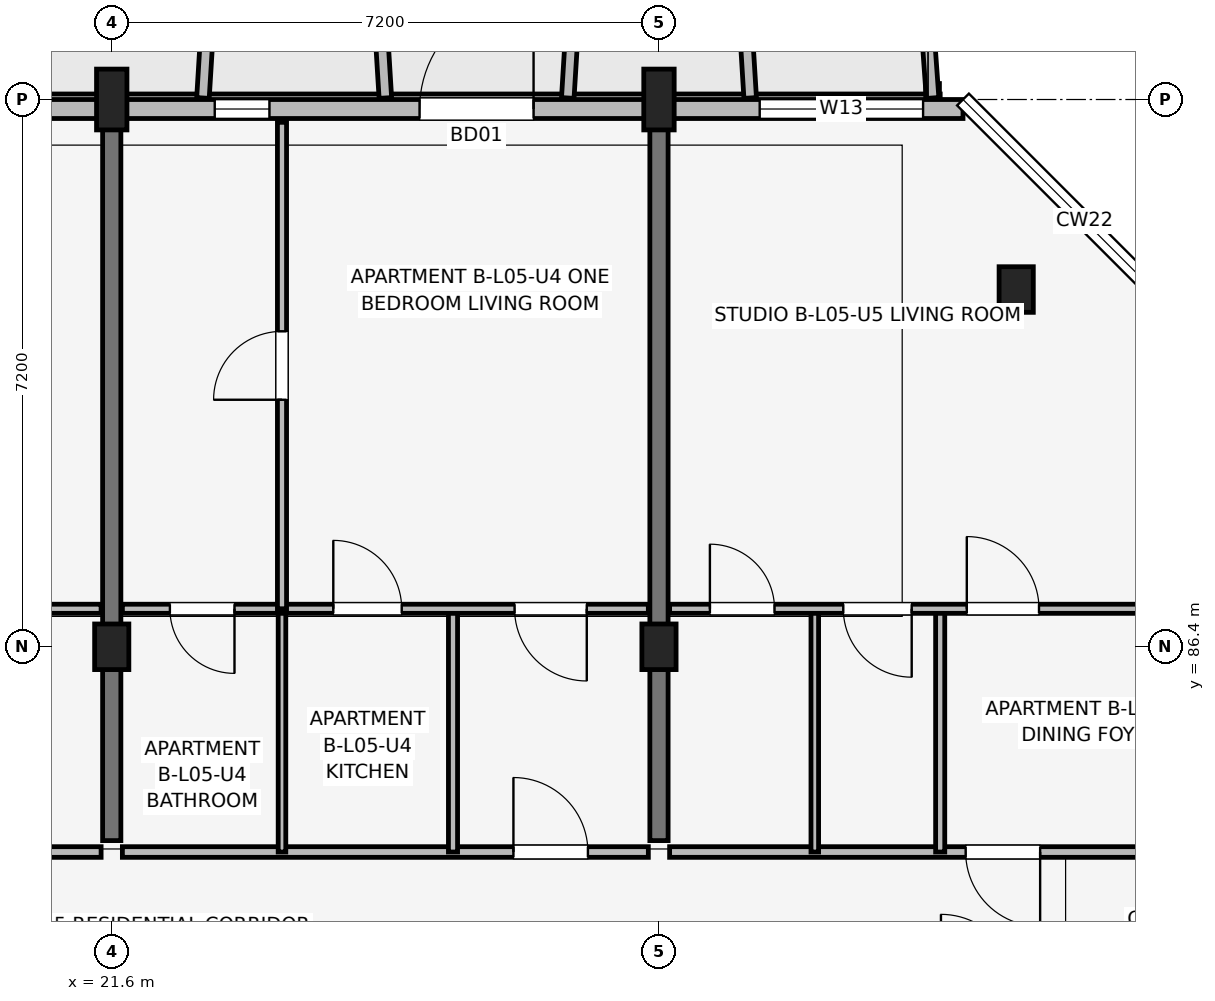
"""IFC4 building model, lengths in metres.
Left out: names, types, materials, properties, quantities, classifications, styles, units other than length and angle.
Written with IfcOpenShell. Run it as: python <this file> out.ifc"""

import sys

from ifc_helpers import new_model, si_unit, direction, frame, frame_2d, origin, origin_2d, place, context, subcontext, project, spatial, rectangle, extrude, element, fill, save


model = new_model("IFC4")
c1 = context("Model", 3, precision=1e-05, world=origin(), true_north=direction((0.0, 1.0)))
c2 = subcontext(c1, "Body", "Model", "MODEL_VIEW")
j1 = project(units=[si_unit("LENGTHUNIT", "METRE"), si_unit("PLANEANGLEUNIT", "RADIAN")], contexts=[c1])
p1 = place(None, origin())
s1 = spatial("IfcSite", under=j1, at=p1, CompositionType="ELEMENT")
p2 = place(p1, origin())
s2 = spatial("IfcBuilding", under=s1, at=p2, CompositionType="ELEMENT")
p3 = place(p2, frame((0.0, 0.0, 18.15)))
s3 = spatial("IfcBuildingStorey", under=s2, at=p3, CompositionType="ELEMENT", Elevation=18.15)
p4 = place(p3, frame((21.6, 86.4, 0.0), z_axis=(0.0, 0.0, 1.0), x_axis=(1.0, 0.0, 0.0)))
e1 = element("IfcColumn", 1, at=p4, inside=s3, PredefinedType="COLUMN", context=c2, shape_type="SweptSolid", body=[
    extrude(rectangle(XDim=0.45, YDim=0.6, at=origin_2d()), origin(), (0.0, 0.0, 1.0), 3.15),
])
p5 = place(p3, frame((21.6, 93.6, 0.0), z_axis=(0.0, 0.0, 1.0), x_axis=(1.0, 0.0, 0.0)))
e2 = element("IfcColumn", 2, at=p5, inside=s3, PredefinedType="COLUMN", context=c2, shape_type="SweptSolid", body=[
    extrude(rectangle(XDim=0.4, YDim=0.8, at=origin_2d()), origin(), (0.0, 0.0, 1.0), 3.15),
])
p6 = place(p3, frame((28.8, 86.4, 0.0), z_axis=(0.0, 0.0, 1.0), x_axis=(1.0, 0.0, 0.0)))
e3 = element("IfcColumn", 3, at=p6, inside=s3, PredefinedType="COLUMN", context=c2, shape_type="SweptSolid", body=[
    extrude(rectangle(XDim=0.45, YDim=0.6, at=origin_2d()), origin(), (0.0, 0.0, 1.0), 3.15),
])
p7 = place(p3, frame((28.8, 93.6, 0.0), z_axis=(0.0, 0.0, 1.0), x_axis=(1.0, 0.0, 0.0)))
e4 = element("IfcColumn", 4, at=p7, inside=s3, PredefinedType="COLUMN", context=c2, shape_type="SweptSolid", body=[
    extrude(rectangle(XDim=0.4, YDim=0.8, at=origin_2d()), origin(), (0.0, 0.0, 1.0), 3.15),
])
p8 = place(p3, frame((33.5, 91.1, 0.0), z_axis=(0.0, 0.0, 1.0), x_axis=(1.0, 0.0, 0.0)))
e5 = element("IfcColumn", 5, at=p8, inside=s3, PredefinedType="COLUMN", context=c2, shape_type="SweptSolid", body=[
    extrude(rectangle(XDim=0.45, YDim=0.6, at=origin_2d()), origin(), (0.0, 0.0, 1.0), 3.15),
])
for number, where, z_axis, x_axis in (
    (6, (21.6, 83.85, 0.0), (0.0, 0.0, 1.0), (0.0, 1.0, 0.0)),
    (7, (28.8, 83.85, 0.0), (0.0, 0.0, 1.0), (0.0, 1.0, 0.0)),
):
    element("IfcWall", number, at=place(p3, frame(where, z_axis=z_axis, x_axis=x_axis)), inside=s3, PredefinedType="SHEAR", context=c2, shape_type="SweptSolid", body=[
        extrude(rectangle(XDim=9.4, YDim=0.24, at=frame_2d((4.7, 0.0))), origin(), (0.0, 0.0, 1.0), 3.15),
    ])
p9 = place(p3, frame((32.8, 93.475, 0.0), z_axis=(0.0, 0.0, 1.0), x_axis=(-1.0, 0.0, 0.0)))
e8 = element("IfcWall", 8, at=p9, inside=s3, PredefinedType="SOLIDWALL", context=c2, shape_type="SweptSolid", body=[
    extrude(rectangle(XDim=29.6, YDim=0.25, at=frame_2d((14.8, 0.0))), origin(), (0.0, 0.0, 1.0), 2.43),
])
p10 = place(p9, frame((21.625, 0.0, 0.0), z_axis=(0.0, 0.0, 1.0), x_axis=(-1.0, 0.0, 0.0)))
e9 = element("IfcOpeningElement", 9, at=p10, cuts=e8, PredefinedType="OPENING", context=c2, shape_type="SweptSolid", body=[
    extrude(rectangle(XDim=1.65, YDim=2.15, at=frame_2d((0.825, 1.075))), frame((0.0, 0.135, 0.0), z_axis=(0.0, -1.0, 0.0), x_axis=(1.0, 0.0, 0.0)), (0.0, 0.0, 1.0), 0.27),
])
p11 = place(p9, frame((7.15, 0.0, 0.0), z_axis=(0.0, 0.0, 1.0), x_axis=(-1.0, 0.0, 0.0)))
e10 = element("IfcOpeningElement", 10, at=p11, cuts=e8, PredefinedType="OPENING", context=c2, shape_type="SweptSolid", body=[
    extrude(rectangle(XDim=1.5, YDim=2.15, at=frame_2d((0.75, 1.075))), frame((0.0, 0.135, 0.0), z_axis=(0.0, -1.0, 0.0), x_axis=(1.0, 0.0, 0.0)), (0.0, 0.0, 1.0), 0.27),
])
p12 = place(p9, frame((27.615, 0.0, 0.75)))
e11 = element("IfcOpeningElement", 11, at=p12, cuts=e8, PredefinedType="OPENING", context=c2, shape_type="SweptSolid", body=[
    extrude(rectangle(XDim=0.6, YDim=1.25, at=frame_2d((0.3, 0.625))), frame((0.0, 0.135, 0.0), z_axis=(0.0, -1.0, 0.0), x_axis=(1.0, 0.0, 0.0)), (0.0, 0.0, 1.0), 0.27),
])
p13 = place(p9, frame((23.525, 0.0, 0.75)))
e12 = element("IfcOpeningElement", 12, at=p13, cuts=e8, PredefinedType="OPENING", context=c2, shape_type="SweptSolid", body=[
    extrude(rectangle(XDim=0.72, YDim=1.35, at=frame_2d((0.36, 0.675))), frame((0.0, 0.135, 0.0), z_axis=(0.0, -1.0, 0.0), x_axis=(1.0, 0.0, 0.0)), (0.0, 0.0, 1.0), 0.27),
])
p14 = place(p9, frame((15.0, 0.0, 0.67)))
e13 = element("IfcOpeningElement", 13, at=p14, cuts=e8, PredefinedType="OPENING", context=c2, shape_type="SweptSolid", body=[
    extrude(rectangle(XDim=2.0, YDim=1.65, at=frame_2d((1.0, 0.825))), frame((0.0, 0.135, 0.0), z_axis=(0.0, -1.0, 0.0), x_axis=(1.0, 0.0, 0.0)), (0.0, 0.0, 1.0), 0.27),
])
p15 = place(p9, frame((9.125, 0.0, 0.75)))
e14 = element("IfcOpeningElement", 14, at=p15, cuts=e8, PredefinedType="OPENING", context=c2, shape_type="SweptSolid", body=[
    extrude(rectangle(XDim=0.72, YDim=1.35, at=frame_2d((0.36, 0.675))), frame((0.0, 0.135, 0.0), z_axis=(0.0, -1.0, 0.0), x_axis=(1.0, 0.0, 0.0)), (0.0, 0.0, 1.0), 0.27),
])
p16 = place(p9, frame((0.525, 0.0, 0.67)))
e15 = element("IfcOpeningElement", 15, at=p16, cuts=e8, PredefinedType="OPENING", context=c2, shape_type="SweptSolid", body=[
    extrude(rectangle(XDim=2.15, YDim=1.65, at=frame_2d((1.075, 0.825))), frame((0.0, 0.135, 0.0), z_axis=(0.0, -1.0, 0.0), x_axis=(1.0, 0.0, 0.0)), (0.0, 0.0, 1.0), 0.27),
])
for number, where, z_axis, x_axis in (
    (16, (22.8, 93.62, 0.0), (0.0, 0.0, 1.0), (0.061, 0.998, 0.0)),
    (17, (25.2, 93.62, 0.0), (0.0, 0.0, 1.0), (-0.061, 0.998, 0.0)),
    (18, (27.6, 93.62, 0.0), (0.0, 0.0, 1.0), (0.061, 0.998, 0.0)),
):
    element("IfcWall", number, at=place(p3, frame(where, z_axis=z_axis, x_axis=x_axis)), inside=s3, PredefinedType="ELEMENTEDWALL", context=c2, shape_type="SweptSolid", body=[
        extrude(rectangle(XDim=1.964, YDim=0.165, at=frame_2d((0.982, 0.0))), origin(), (0.0, 0.0, 1.0), 2.53),
    ])
p17 = place(p3, frame((30.0, 93.62, 0.0), z_axis=(0.0, 0.0, 1.0), x_axis=(-0.061170732449, 0.998127317276, 0.0)))
e19 = element("IfcWall", 19, at=p17, inside=s3, PredefinedType="ELEMENTEDWALL", context=c2, shape_type="SweptSolid", body=[
    extrude(rectangle(XDim=1.964, YDim=0.165, at=frame_2d((0.982, 0.0))), origin(), (0.0, 0.0, 1.0), 2.95),
])
p18 = place(p3, frame((32.4, 93.62, 0.0), z_axis=(0.0, 0.0, 1.0), x_axis=(-0.071194071069, 0.997462482625, 0.0)))
e20 = element("IfcWall", 20, at=p18, inside=s3, PredefinedType="ELEMENTEDWALL", context=c2, shape_type="SweptSolid", body=[
    extrude(rectangle(XDim=1.965, YDim=0.165, at=frame_2d((0.982, 0.0))), origin(), (0.0, 0.0, 1.0), 2.95),
])
p19 = place(p3, frame((14.54, 83.7, 0.0), z_axis=(0.0, 0.0, 1.0), x_axis=(1.0, 0.0, 0.0)))
e21 = element("IfcWall", 21, at=p19, inside=s3, PredefinedType="PARTITIONING", context=c2, shape_type="SweptSolid", body=[
    extrude(rectangle(XDim=6.92, YDim=0.14, at=frame_2d((3.46, 0.0))), origin(), (0.0, 0.0, 1.0), 2.38),
])
p20 = place(p19, frame((4.995, 0.0, 0.0)))
e22 = element("IfcOpeningElement", 22, at=p20, cuts=e21, PredefinedType="OPENING", context=c2, shape_type="SweptSolid", body=[
    extrude(rectangle(XDim=0.98, YDim=2.1, at=frame_2d((0.49, 1.05))), frame((0.0, 0.08, 0.0), z_axis=(0.0, -1.0, 0.0), x_axis=(1.0, 0.0, 0.0)), (0.0, 0.0, 1.0), 0.16),
])
p21 = place(p3, frame((14.54, 86.9, 0.0), z_axis=(0.0, 0.0, 1.0), x_axis=(1.0, 0.0, 0.0)))
e23 = element("IfcWall", 23, at=p21, inside=s3, PredefinedType="PARTITIONING", context=c2, shape_type="SweptSolid", body=[
    extrude(rectangle(XDim=6.92, YDim=0.12, at=frame_2d((3.46, 0.0))), origin(), (0.0, 0.0, 1.0), 2.38),
])
p22 = place(p21, frame((1.475, 0.0, 0.0), z_axis=(0.0, 0.0, 1.0), x_axis=(-1.0, 0.0, 0.0)))
e24 = element("IfcOpeningElement", 24, at=p22, cuts=e23, PredefinedType="OPENING", context=c2, shape_type="SweptSolid", body=[
    extrude(rectangle(XDim=0.85, YDim=2.08, at=frame_2d((0.425, 1.04))), frame((0.0, 0.07, 0.0), z_axis=(0.0, -1.0, 0.0), x_axis=(1.0, 0.0, 0.0)), (0.0, 0.0, 1.0), 0.14),
])
p23 = place(p21, frame((2.625, 0.0, 0.0)))
e25 = element("IfcOpeningElement", 25, at=p23, cuts=e23, PredefinedType="OPENING", context=c2, shape_type="SweptSolid", body=[
    extrude(rectangle(XDim=0.9, YDim=2.08, at=frame_2d((0.45, 1.04))), frame((0.0, 0.07, 0.0), z_axis=(0.0, -1.0, 0.0), x_axis=(1.0, 0.0, 0.0)), (0.0, 0.0, 1.0), 0.14),
])
p24 = place(p21, frame((5.96, 0.0, 0.0), z_axis=(0.0, 0.0, 1.0), x_axis=(-1.0, 0.0, 0.0)))
e26 = element("IfcOpeningElement", 26, at=p24, cuts=e23, PredefinedType="OPENING", context=c2, shape_type="SweptSolid", body=[
    extrude(rectangle(XDim=0.95, YDim=2.08, at=frame_2d((0.475, 1.04))), frame((0.0, 0.07, 0.0), z_axis=(0.0, -1.0, 0.0), x_axis=(1.0, 0.0, 0.0)), (0.0, 0.0, 1.0), 0.14),
])
p25 = place(p3, frame((21.74, 83.7, 0.0), z_axis=(0.0, 0.0, 1.0), x_axis=(1.0, 0.0, 0.0)))
e27 = element("IfcWall", 27, at=p25, inside=s3, PredefinedType="PARTITIONING", context=c2, shape_type="SweptSolid", body=[
    extrude(rectangle(XDim=6.92, YDim=0.14, at=frame_2d((3.46, 0.0))), origin(), (0.0, 0.0, 1.0), 2.38),
])
p26 = place(p25, frame((5.145, 0.0, 0.0)))
e28 = element("IfcOpeningElement", 28, at=p26, cuts=e27, PredefinedType="OPENING", context=c2, shape_type="SweptSolid", body=[
    extrude(rectangle(XDim=0.98, YDim=2.1, at=frame_2d((0.49, 1.05))), frame((0.0, 0.08, 0.0), z_axis=(0.0, -1.0, 0.0), x_axis=(1.0, 0.0, 0.0)), (0.0, 0.0, 1.0), 0.16),
])
p27 = place(p3, frame((23.84, 83.7, 0.0), z_axis=(0.0, 0.0, 1.0), x_axis=(0.0, 1.0, 0.0)))
e29 = element("IfcWall", 29, at=p27, inside=s3, PredefinedType="PARTITIONING", context=c2, shape_type="SweptSolid", body=[
    extrude(rectangle(XDim=3.2, YDim=0.1, at=frame_2d((1.6, 0.0))), origin(), (0.0, 0.0, 1.0), 2.375),
])
p28 = place(p3, frame((26.09, 83.7, 0.0), z_axis=(0.0, 0.0, 1.0), x_axis=(0.0, 1.0, 0.0)))
e30 = element("IfcWall", 30, at=p28, inside=s3, PredefinedType="PARTITIONING", context=c2, shape_type="SweptSolid", body=[
    extrude(rectangle(XDim=3.2, YDim=0.12, at=frame_2d((1.6, 0.0))), origin(), (0.0, 0.0, 1.0), 2.375),
])
p29 = place(p3, frame((21.74, 86.9, 0.0), z_axis=(0.0, 0.0, 1.0), x_axis=(1.0, 0.0, 0.0)))
e31 = element("IfcWall", 31, at=p29, inside=s3, PredefinedType="PARTITIONING", context=c2, shape_type="SweptSolid", body=[
    extrude(rectangle(XDim=6.92, YDim=0.12, at=frame_2d((3.46, 0.0))), origin(), (0.0, 0.0, 1.0), 2.38),
])
p30 = place(p29, frame((1.475, 0.0, 0.0), z_axis=(0.0, 0.0, 1.0), x_axis=(-1.0, 0.0, 0.0)))
e32 = element("IfcOpeningElement", 32, at=p30, cuts=e31, PredefinedType="OPENING", context=c2, shape_type="SweptSolid", body=[
    extrude(rectangle(XDim=0.85, YDim=2.08, at=frame_2d((0.425, 1.04))), frame((0.0, 0.07, 0.0), z_axis=(0.0, -1.0, 0.0), x_axis=(1.0, 0.0, 0.0)), (0.0, 0.0, 1.0), 0.14),
])
p31 = place(p29, frame((2.775, 0.0, 0.0)))
e33 = element("IfcOpeningElement", 33, at=p31, cuts=e31, PredefinedType="OPENING", context=c2, shape_type="SweptSolid", body=[
    extrude(rectangle(XDim=0.9, YDim=2.08, at=frame_2d((0.45, 1.04))), frame((0.0, 0.07, 0.0), z_axis=(0.0, -1.0, 0.0), x_axis=(1.0, 0.0, 0.0)), (0.0, 0.0, 1.0), 0.14),
])
p32 = place(p29, frame((6.11, 0.0, 0.0), z_axis=(0.0, 0.0, 1.0), x_axis=(-1.0, 0.0, 0.0)))
e34 = element("IfcOpeningElement", 34, at=p32, cuts=e31, PredefinedType="OPENING", context=c2, shape_type="SweptSolid", body=[
    extrude(rectangle(XDim=0.95, YDim=2.08, at=frame_2d((0.475, 1.04))), frame((0.0, 0.07, 0.0), z_axis=(0.0, -1.0, 0.0), x_axis=(1.0, 0.0, 0.0)), (0.0, 0.0, 1.0), 0.14),
])
p33 = place(p3, frame((23.84, 86.9, 0.0), z_axis=(0.0, 0.0, 1.0), x_axis=(0.0, 1.0, 0.0)))
e35 = element("IfcWall", 35, at=p33, inside=s3, PredefinedType="PARTITIONING", context=c2, shape_type="SweptSolid", body=[
    extrude(rectangle(XDim=6.4, YDim=0.12, at=frame_2d((3.2, 0.0))), origin(), (0.0, 0.0, 1.0), 2.38),
])
p34 = place(p33, frame((2.75, 0.0, 0.0)))
e36 = element("IfcOpeningElement", 36, at=p34, cuts=e35, PredefinedType="OPENING", context=c2, shape_type="SweptSolid", body=[
    extrude(rectangle(XDim=0.9, YDim=2.08, at=frame_2d((0.45, 1.04))), frame((0.0, 0.07, 0.0), z_axis=(0.0, -1.0, 0.0), x_axis=(1.0, 0.0, 0.0)), (0.0, 0.0, 1.0), 0.14),
])
p35 = place(p3, frame((28.94, 83.7, 0.0), z_axis=(0.0, 0.0, 1.0), x_axis=(1.0, 0.0, 0.0)))
e37 = element("IfcWall", 37, at=p35, inside=s3, PredefinedType="PARTITIONING", context=c2, shape_type="SweptSolid", body=[
    extrude(rectangle(XDim=6.92, YDim=0.14, at=frame_2d((3.46, 0.0))), origin(), (0.0, 0.0, 1.0), 2.38),
])
p36 = place(p35, frame((4.875, 0.0, 0.0), z_axis=(0.0, 0.0, 1.0), x_axis=(-1.0, 0.0, 0.0)))
e38 = element("IfcOpeningElement", 38, at=p36, cuts=e37, PredefinedType="OPENING", context=c2, shape_type="SweptSolid", body=[
    extrude(rectangle(XDim=0.98, YDim=2.1, at=frame_2d((0.49, 1.05))), frame((0.0, 0.08, 0.0), z_axis=(0.0, -1.0, 0.0), x_axis=(1.0, 0.0, 0.0)), (0.0, 0.0, 1.0), 0.16),
])
p37 = place(p3, frame((30.85, 83.7, 0.0), z_axis=(0.0, 0.0, 1.0), x_axis=(0.0, 1.0, 0.0)))
e39 = element("IfcWall", 39, at=p37, inside=s3, PredefinedType="PARTITIONING", context=c2, shape_type="SweptSolid", body=[
    extrude(rectangle(XDim=3.2, YDim=0.1, at=frame_2d((1.6, 0.0))), origin(), (0.0, 0.0, 1.0), 2.375),
])
p38 = place(p3, frame((32.5, 83.7, 0.0), z_axis=(0.0, 0.0, 1.0), x_axis=(0.0, 1.0, 0.0)))
e40 = element("IfcWall", 40, at=p38, inside=s3, PredefinedType="PARTITIONING", context=c2, shape_type="SweptSolid", body=[
    extrude(rectangle(XDim=3.2, YDim=0.12, at=frame_2d((1.6, 0.0))), origin(), (0.0, 0.0, 1.0), 2.375),
])
p39 = place(p3, frame((28.94, 86.9, 0.0), z_axis=(0.0, 0.0, 1.0), x_axis=(1.0, 0.0, 0.0)))
e41 = element("IfcWall", 41, at=p39, inside=s3, PredefinedType="PARTITIONING", context=c2, shape_type="SweptSolid", body=[
    extrude(rectangle(XDim=6.92, YDim=0.12, at=frame_2d((3.46, 0.0))), origin(), (0.0, 0.0, 1.0), 2.38),
])
p40 = place(p39, frame((0.53, 0.0, 0.0)))
e42 = element("IfcOpeningElement", 42, at=p40, cuts=e41, PredefinedType="OPENING", context=c2, shape_type="SweptSolid", body=[
    extrude(rectangle(XDim=0.85, YDim=2.08, at=frame_2d((0.425, 1.04))), frame((0.0, 0.07, 0.0), z_axis=(0.0, -1.0, 0.0), x_axis=(1.0, 0.0, 0.0)), (0.0, 0.0, 1.0), 0.14),
])
p41 = place(p39, frame((3.185, 0.0, 0.0), z_axis=(0.0, 0.0, 1.0), x_axis=(-1.0, 0.0, 0.0)))
e43 = element("IfcOpeningElement", 43, at=p41, cuts=e41, PredefinedType="OPENING", context=c2, shape_type="SweptSolid", body=[
    extrude(rectangle(XDim=0.9, YDim=2.08, at=frame_2d((0.45, 1.04))), frame((0.0, 0.07, 0.0), z_axis=(0.0, -1.0, 0.0), x_axis=(1.0, 0.0, 0.0)), (0.0, 0.0, 1.0), 0.14),
])
p42 = place(p39, frame((3.91, 0.0, 0.0)))
e44 = element("IfcOpeningElement", 44, at=p42, cuts=e41, PredefinedType="OPENING", context=c2, shape_type="SweptSolid", body=[
    extrude(rectangle(XDim=0.95, YDim=2.08, at=frame_2d((0.475, 1.04))), frame((0.0, 0.07, 0.0), z_axis=(0.0, -1.0, 0.0), x_axis=(1.0, 0.0, 0.0)), (0.0, 0.0, 1.0), 0.14),
])
p43 = place(p11, origin())
e45 = element("IfcDoor", 45, at=p43, inside=s3, OperationType="SINGLE_SWING_LEFT", PredefinedType="DOOR", context=c2, shape_type="SweptSolid", body=[
    extrude(rectangle(XDim=1.5, YDim=2.15, at=frame_2d((0.75, 1.075))), frame((0.0, 0.025, 0.0), z_axis=(0.0, -1.0, 0.0), x_axis=(1.0, 0.0, 0.0)), (0.0, 0.0, 1.0), 0.05),
])
fill(e10, e45)
p44 = place(p15, origin())
e46 = element("IfcWindow", 46, at=p44, inside=s3, PartitioningType="SINGLE_PANEL", PredefinedType="WINDOW", context=c2, shape_type="SweptSolid", body=[
    extrude(rectangle(XDim=0.72, YDim=1.35, at=frame_2d((0.36, 0.675))), frame((0.0, 0.03, 0.0), z_axis=(0.0, -1.0, 0.0), x_axis=(1.0, 0.0, 0.0)), (0.0, 0.0, 1.0), 0.06),
])
fill(e14, e46)
p45 = place(p16, origin())
e47 = element("IfcWindow", 47, at=p45, inside=s3, PartitioningType="SINGLE_PANEL", PredefinedType="WINDOW", context=c2, shape_type="SweptSolid", body=[
    extrude(rectangle(XDim=2.15, YDim=1.65, at=frame_2d((1.075, 0.825))), frame((0.0, 0.03, 0.0), z_axis=(0.0, -1.0, 0.0), x_axis=(1.0, 0.0, 0.0)), (0.0, 0.0, 1.0), 0.06),
])
fill(e15, e47)
p46 = place(p26, origin())
e48 = element("IfcDoor", 48, at=p46, inside=s3, OperationType="SINGLE_SWING_LEFT", PredefinedType="DOOR", context=c2, shape_type="SweptSolid", body=[
    extrude(rectangle(XDim=0.98, YDim=2.1, at=frame_2d((0.49, 1.05))), frame((0.0, 0.025, 0.0), z_axis=(0.0, -1.0, 0.0), x_axis=(1.0, 0.0, 0.0)), (0.0, 0.0, 1.0), 0.05),
])
fill(e28, e48)
p47 = place(p30, origin())
e49 = element("IfcDoor", 49, at=p47, inside=s3, OperationType="SINGLE_SWING_RIGHT", PredefinedType="DOOR", context=c2, shape_type="SweptSolid", body=[
    extrude(rectangle(XDim=0.85, YDim=2.08, at=frame_2d((0.425, 1.04))), frame((0.0, 0.025, 0.0), z_axis=(0.0, -1.0, 0.0), x_axis=(1.0, 0.0, 0.0)), (0.0, 0.0, 1.0), 0.05),
])
fill(e32, e49)
p48 = place(p31, origin())
e50 = element("IfcDoor", 50, at=p48, inside=s3, OperationType="SINGLE_SWING_LEFT", PredefinedType="DOOR", context=c2, shape_type="SweptSolid", body=[
    extrude(rectangle(XDim=0.9, YDim=2.08, at=frame_2d((0.45, 1.04))), frame((0.0, 0.025, 0.0), z_axis=(0.0, -1.0, 0.0), x_axis=(1.0, 0.0, 0.0)), (0.0, 0.0, 1.0), 0.05),
])
fill(e33, e50)
p49 = place(p32, origin())
e51 = element("IfcDoor", 51, at=p49, inside=s3, OperationType="SINGLE_SWING_RIGHT", PredefinedType="DOOR", context=c2, shape_type="SweptSolid", body=[
    extrude(rectangle(XDim=0.95, YDim=2.08, at=frame_2d((0.475, 1.04))), frame((0.0, 0.025, 0.0), z_axis=(0.0, -1.0, 0.0), x_axis=(1.0, 0.0, 0.0)), (0.0, 0.0, 1.0), 0.05),
])
fill(e34, e51)
p50 = place(p34, origin())
e52 = element("IfcDoor", 52, at=p50, inside=s3, OperationType="SINGLE_SWING_LEFT", PredefinedType="DOOR", context=c2, shape_type="SweptSolid", body=[
    extrude(rectangle(XDim=0.9, YDim=2.08, at=frame_2d((0.45, 1.04))), frame((0.0, 0.025, 0.0), z_axis=(0.0, -1.0, 0.0), x_axis=(1.0, 0.0, 0.0)), (0.0, 0.0, 1.0), 0.05),
])
fill(e36, e52)
p51 = place(p36, origin())
e53 = element("IfcDoor", 53, at=p51, inside=s3, OperationType="SINGLE_SWING_RIGHT", PredefinedType="DOOR", context=c2, shape_type="SweptSolid", body=[
    extrude(rectangle(XDim=0.98, YDim=2.1, at=frame_2d((0.49, 1.05))), frame((0.0, 0.025, 0.0), z_axis=(0.0, -1.0, 0.0), x_axis=(1.0, 0.0, 0.0)), (0.0, 0.0, 1.0), 0.05),
])
fill(e38, e53)
p52 = place(p40, origin())
e54 = element("IfcDoor", 54, at=p52, inside=s3, OperationType="SINGLE_SWING_LEFT", PredefinedType="DOOR", context=c2, shape_type="SweptSolid", body=[
    extrude(rectangle(XDim=0.85, YDim=2.08, at=frame_2d((0.425, 1.04))), frame((0.0, 0.025, 0.0), z_axis=(0.0, -1.0, 0.0), x_axis=(1.0, 0.0, 0.0)), (0.0, 0.0, 1.0), 0.05),
])
fill(e42, e54)
p53 = place(p41, origin())
e55 = element("IfcDoor", 55, at=p53, inside=s3, OperationType="SINGLE_SWING_RIGHT", PredefinedType="DOOR", context=c2, shape_type="SweptSolid", body=[
    extrude(rectangle(XDim=0.9, YDim=2.08, at=frame_2d((0.45, 1.04))), frame((0.0, 0.025, 0.0), z_axis=(0.0, -1.0, 0.0), x_axis=(1.0, 0.0, 0.0)), (0.0, 0.0, 1.0), 0.05),
])
fill(e43, e55)
p54 = place(p42, origin())
e56 = element("IfcDoor", 56, at=p54, inside=s3, OperationType="SINGLE_SWING_LEFT", PredefinedType="DOOR", context=c2, shape_type="SweptSolid", body=[
    extrude(rectangle(XDim=0.95, YDim=2.08, at=frame_2d((0.475, 1.04))), frame((0.0, 0.025, 0.0), z_axis=(0.0, -1.0, 0.0), x_axis=(1.0, 0.0, 0.0)), (0.0, 0.0, 1.0), 0.05),
])
fill(e44, e56)
save(model, sys.argv[1])
